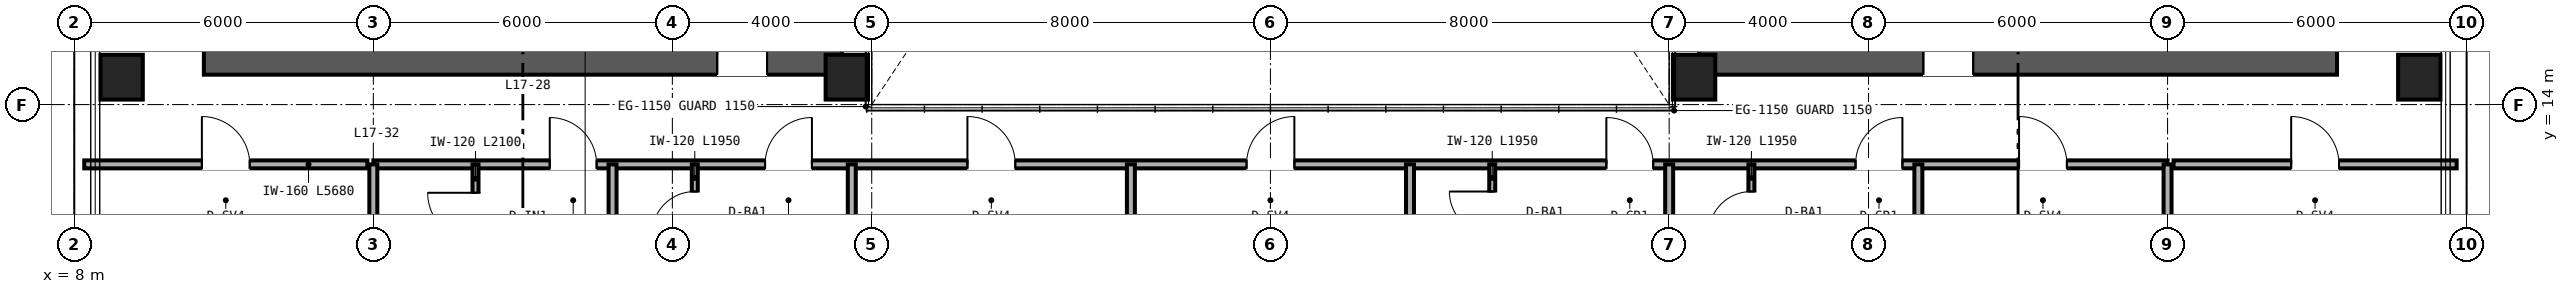
"""IFC4 building model, lengths in metres.
Left out: names, types, materials, properties, quantities, classifications, styles, units other than length and angle.
Written with IfcOpenShell. Run it as: python <this file> out.ifc"""

import sys

from ifc_helpers import new_model, si_unit, direction, frame, frame_2d, origin, origin_2d, place, context, subcontext, project, spatial, rectangle, hollow_rectangle, extrude, source, transform, mapped, element, fill, save


model = new_model("IFC4")
c1 = context("Model", 3, precision=1e-05, world=origin(), true_north=direction((0.0, 1.0)))
c2 = subcontext(c1, "Body", "Model", "MODEL_VIEW")
j1 = project(units=[si_unit("LENGTHUNIT", "METRE"), si_unit("PLANEANGLEUNIT", "RADIAN")], contexts=[c1])
p1 = place(None, origin())
s1 = spatial("IfcSite", under=j1, at=p1, CompositionType="ELEMENT")
p2 = place(p1, origin())
s2 = spatial("IfcBuilding", under=s1, at=p2, CompositionType="ELEMENT")
p3 = place(p2, frame((0.0, 0.0, 70.8)))
s3 = spatial("IfcBuildingStorey", under=s2, at=p3, CompositionType="ELEMENT", Elevation=70.8)
p4 = place(p3, frame((10.6, 15.0, 0.0), z_axis=(0.0, 0.0, 1.0), x_axis=(1.0, 0.0, 0.0)))
e1 = element("IfcWall", 1, at=p4, inside=s3, PredefinedType="SHEAR", context=c2, shape_type="SweptSolid", body=[
    extrude(rectangle(XDim=12.8, YDim=0.8, at=frame_2d((6.4, 0.0))), origin(), (0.0, 0.0, 1.0), 3.35),
])
p5 = place(p4, frame((10.3, 0.0, 0.0)))
e2 = element("IfcOpeningElement", 2, at=p5, cuts=e1, PredefinedType="OPENING", context=c2, shape_type="SweptSolid", body=[
    extrude(rectangle(XDim=1.0, YDim=2.15, at=frame_2d((0.5, 1.075))), frame((0.0, 0.41, 0.0), z_axis=(0.0, -1.0, 0.0), x_axis=(1.0, 0.0, 0.0)), (0.0, 0.0, 1.0), 0.82),
])
p6 = place(p3, frame((40.6, 15.0, 0.0), z_axis=(0.0, 0.0, 1.0), x_axis=(1.0, 0.0, 0.0)))
e3 = element("IfcWall", 3, at=p6, inside=s3, PredefinedType="SHEAR", context=c2, shape_type="SweptSolid", body=[
    extrude(rectangle(XDim=12.8, YDim=0.8, at=frame_2d((6.4, 0.0))), origin(), (0.0, 0.0, 1.0), 3.35),
])
p7 = place(p6, frame((4.5, 0.0, 0.0)))
e4 = element("IfcOpeningElement", 4, at=p7, cuts=e3, PredefinedType="OPENING", context=c2, shape_type="SweptSolid", body=[
    extrude(rectangle(XDim=1.0, YDim=2.15, at=frame_2d((0.5, 1.075))), frame((0.0, 0.41, 0.0), z_axis=(0.0, -1.0, 0.0), x_axis=(1.0, 0.0, 0.0)), (0.0, 0.0, 1.0), 0.82),
])
m1 = source(origin(), c2, "Body", "SweptSolid", [
    extrude(hollow_rectangle(XDim=0.85, YDim=0.9, WallThickness=0.04, at=origin_2d()), origin(), (0.0, 0.0, 1.0), 3.35),
])
for number, where, z_axis, x_axis in (
    (5, (8.95, 14.55, 0.0), (0.0, 0.0, 1.0), (1.0, 0.0, 0.0)),
    (6, (23.5, 14.55, 0.0), (0.0, 0.0, 1.0), (1.0, 0.0, 0.0)),
    (7, (40.5, 14.55, 0.0), (0.0, 0.0, 1.0), (1.0, 0.0, 0.0)),
    (8, (55.05, 14.55, 0.0), (0.0, 0.0, 1.0), (1.0, 0.0, 0.0)),
):
    element("IfcColumn", number, at=place(p3, frame(where, z_axis=z_axis, x_axis=x_axis)), inside=s3, PredefinedType="COLUMN", context=c2, shape_type="MappedRepresentation", body=[
        mapped(m1, transform((0.0, 0.0, 0.0), scale=1.0)),
    ])
p8 = place(p3, frame((8.2, 12.8, 0.0), z_axis=(0.0, 0.0, 1.0), x_axis=(1.0, 0.0, 0.0)))
e9 = element("IfcWall", 9, at=p8, inside=s3, PredefinedType="PARTITIONING", context=c2, shape_type="SweptSolid", body=[
    extrude(rectangle(XDim=5.68, YDim=0.16, at=frame_2d((2.84, 0.0))), origin(), (0.0, 0.0, 1.0), 3.35),
])
p9 = place(p8, frame((2.36, 0.0, 0.0)))
e10 = element("IfcOpeningElement", 10, at=p9, cuts=e9, PredefinedType="OPENING", context=c2, shape_type="SweptSolid", body=[
    extrude(rectangle(XDim=0.96, YDim=2.15, at=frame_2d((0.48, 1.075))), frame((0.0, 0.09, 0.0), z_axis=(0.0, -1.0, 0.0), x_axis=(1.0, 0.0, 0.0)), (0.0, 0.0, 1.0), 0.18),
])
p10 = place(p3, frame((50.12, 12.8, 0.0), z_axis=(0.0, 0.0, 1.0), x_axis=(1.0, 0.0, 0.0)))
e11 = element("IfcWall", 11, at=p10, inside=s3, PredefinedType="PARTITIONING", context=c2, shape_type="SweptSolid", body=[
    extrude(rectangle(XDim=5.68, YDim=0.16, at=frame_2d((2.84, 0.0))), origin(), (0.0, 0.0, 1.0), 3.35),
])
p11 = place(p10, frame((2.36, 0.0, 0.0)))
e12 = element("IfcOpeningElement", 12, at=p11, cuts=e11, PredefinedType="OPENING", context=c2, shape_type="SweptSolid", body=[
    extrude(rectangle(XDim=0.96, YDim=2.15, at=frame_2d((0.48, 1.075))), frame((0.0, 0.09, 0.0), z_axis=(0.0, -1.0, 0.0), x_axis=(1.0, 0.0, 0.0)), (0.0, 0.0, 1.0), 0.18),
])
p12 = place(p3, frame((14.0, 12.8, 0.0), z_axis=(0.0, 0.0, 1.0), x_axis=(1.0, 0.0, 0.0)))
e13 = element("IfcWall", 13, at=p12, inside=s3, PredefinedType="PARTITIONING", context=c2, shape_type="SweptSolid", body=[
    extrude(rectangle(XDim=36.0, YDim=0.16, at=frame_2d((18.0, 0.0))), origin(), (0.0, 0.0, 1.0), 2.571),
])
p13 = place(p12, frame((3.54, 0.0, 0.0)))
e14 = element("IfcOpeningElement", 14, at=p13, cuts=e13, PredefinedType="OPENING", context=c2, shape_type="SweptSolid", body=[
    extrude(rectangle(XDim=0.94, YDim=2.15, at=frame_2d((0.47, 1.075))), frame((0.0, 0.09, 0.0), z_axis=(0.0, -1.0, 0.0), x_axis=(1.0, 0.0, 0.0)), (0.0, 0.0, 1.0), 0.18),
])
p14 = place(p12, frame((7.86, 0.0, 0.0)))
e15 = element("IfcOpeningElement", 15, at=p14, cuts=e13, PredefinedType="OPENING", context=c2, shape_type="SweptSolid", body=[
    extrude(rectangle(XDim=0.94, YDim=2.15, at=frame_2d((0.47, 1.075))), frame((0.0, 0.09, 0.0), z_axis=(0.0, -1.0, 0.0), x_axis=(1.0, 0.0, 0.0)), (0.0, 0.0, 1.0), 0.18),
])
p15 = place(p12, frame((11.92, 0.0, 0.0)))
e16 = element("IfcOpeningElement", 16, at=p15, cuts=e13, PredefinedType="OPENING", context=c2, shape_type="SweptSolid", body=[
    extrude(rectangle(XDim=0.96, YDim=2.15, at=frame_2d((0.48, 1.075))), frame((0.0, 0.09, 0.0), z_axis=(0.0, -1.0, 0.0), x_axis=(1.0, 0.0, 0.0)), (0.0, 0.0, 1.0), 0.18),
])
p16 = place(p12, frame((17.52, 0.0, 0.0)))
e17 = element("IfcOpeningElement", 17, at=p16, cuts=e13, PredefinedType="OPENING", context=c2, shape_type="SweptSolid", body=[
    extrude(rectangle(XDim=0.96, YDim=2.15, at=frame_2d((0.48, 1.075))), frame((0.0, 0.09, 0.0), z_axis=(0.0, -1.0, 0.0), x_axis=(1.0, 0.0, 0.0)), (0.0, 0.0, 1.0), 0.18),
])
p17 = place(p12, frame((24.74, 0.0, 0.0)))
e18 = element("IfcOpeningElement", 18, at=p17, cuts=e13, PredefinedType="OPENING", context=c2, shape_type="SweptSolid", body=[
    extrude(rectangle(XDim=0.94, YDim=2.15, at=frame_2d((0.47, 1.075))), frame((0.0, 0.09, 0.0), z_axis=(0.0, -1.0, 0.0), x_axis=(1.0, 0.0, 0.0)), (0.0, 0.0, 1.0), 0.18),
])
p18 = place(p12, frame((29.74, 0.0, 0.0)))
e19 = element("IfcOpeningElement", 19, at=p18, cuts=e13, PredefinedType="OPENING", context=c2, shape_type="SweptSolid", body=[
    extrude(rectangle(XDim=0.94, YDim=2.15, at=frame_2d((0.47, 1.075))), frame((0.0, 0.09, 0.0), z_axis=(0.0, -1.0, 0.0), x_axis=(1.0, 0.0, 0.0)), (0.0, 0.0, 1.0), 0.18),
])
p19 = place(p12, frame((33.02, 0.0, 0.0)))
e20 = element("IfcOpeningElement", 20, at=p19, cuts=e13, PredefinedType="OPENING", context=c2, shape_type="SweptSolid", body=[
    extrude(rectangle(XDim=0.96, YDim=2.15, at=frame_2d((0.48, 1.075))), frame((0.0, 0.09, 0.0), z_axis=(0.0, -1.0, 0.0), x_axis=(1.0, 0.0, 0.0)), (0.0, 0.0, 1.0), 0.18),
])
for number, where, z_axis, x_axis in (
    (21, (14.0, 2.36, 0.0), (0.0, 0.0, 1.0), (0.0, 1.0, 0.0)),
    (22, (50.0, 2.36, 0.0), (0.0, 0.0, 1.0), (0.0, 1.0, 0.0)),
    (23, (18.8, 2.36, 0.0), (0.0, 0.0, 1.0), (0.0, 1.0, 0.0)),
):
    element("IfcWall", number, at=place(p3, frame(where, z_axis=z_axis, x_axis=x_axis)), inside=s3, PredefinedType="PARTITIONING", context=c2, shape_type="SweptSolid", body=[
        extrude(rectangle(XDim=10.44, YDim=0.16, at=frame_2d((5.22, 0.0))), origin(), (0.0, 0.0, 1.0), 2.657),
    ])
p20 = place(p3, frame((16.05, 10.7, 0.0), z_axis=(0.0, 0.0, 1.0), x_axis=(0.0, 1.0, 0.0)))
e24 = element("IfcWall", 24, at=p20, inside=s3, PredefinedType="PARTITIONING", context=c2, shape_type="SweptSolid", body=[
    extrude(rectangle(XDim=2.1, YDim=0.12, at=frame_2d((1.05, 0.0))), origin(), (0.0, 0.0, 1.0), 3.35),
])
p21 = place(p20, frame((0.57, 0.0, 0.0)))
e25 = element("IfcOpeningElement", 25, at=p21, cuts=e24, PredefinedType="OPENING", context=c2, shape_type="SweptSolid", body=[
    extrude(rectangle(XDim=0.96, YDim=2.15, at=frame_2d((0.48, 1.075))), frame((0.0, 0.07, 0.0), z_axis=(0.0, -1.0, 0.0), x_axis=(1.0, 0.0, 0.0)), (0.0, 0.0, 1.0), 0.14),
])
p22 = place(p3, frame((23.6, 2.36, 0.0), z_axis=(0.0, 0.0, 1.0), x_axis=(0.0, 1.0, 0.0)))
e26 = element("IfcWall", 26, at=p22, inside=s3, PredefinedType="PARTITIONING", context=c2, shape_type="SweptSolid", body=[
    extrude(rectangle(XDim=10.44, YDim=0.16, at=frame_2d((5.22, 0.0))), origin(), (0.0, 0.0, 1.0), 2.423),
])
p23 = place(p3, frame((20.45, 10.85, 0.0), z_axis=(0.0, 0.0, 1.0), x_axis=(0.0, 1.0, 0.0)))
e27 = element("IfcWall", 27, at=p23, inside=s3, PredefinedType="PARTITIONING", context=c2, shape_type="SweptSolid", body=[
    extrude(rectangle(XDim=1.95, YDim=0.12, at=frame_2d((0.975, 0.0))), origin(), (0.0, 0.0, 1.0), 3.35),
])
p24 = place(p23, frame((0.545, 0.0, 0.0)))
e28 = element("IfcOpeningElement", 28, at=p24, cuts=e27, PredefinedType="OPENING", context=c2, shape_type="SweptSolid", body=[
    extrude(rectangle(XDim=0.86, YDim=2.1, at=frame_2d((0.43, 1.05))), frame((0.0, 0.07, 0.0), z_axis=(0.0, -1.0, 0.0), x_axis=(1.0, 0.0, 0.0)), (0.0, 0.0, 1.0), 0.14),
])
for number, where, z_axis, x_axis in (
    (29, (29.2, 2.36, 0.0), (0.0, 0.0, 1.0), (0.0, 1.0, 0.0)),
    (30, (34.8, 2.36, 0.0), (0.0, 0.0, 1.0), (0.0, 1.0, 0.0)),
    (31, (40.0, 2.36, 0.0), (0.0, 0.0, 1.0), (0.0, 1.0, 0.0)),
):
    element("IfcWall", number, at=place(p3, frame(where, z_axis=z_axis, x_axis=x_axis)), inside=s3, PredefinedType="PARTITIONING", context=c2, shape_type="SweptSolid", body=[
        extrude(rectangle(XDim=10.44, YDim=0.16, at=frame_2d((5.22, 0.0))), origin(), (0.0, 0.0, 1.0), 2.423),
    ])
p25 = place(p3, frame((36.45, 10.85, 0.0), z_axis=(0.0, 0.0, 1.0), x_axis=(0.0, 1.0, 0.0)))
e32 = element("IfcWall", 32, at=p25, inside=s3, PredefinedType="PARTITIONING", context=c2, shape_type="SweptSolid", body=[
    extrude(rectangle(XDim=1.95, YDim=0.12, at=frame_2d((0.975, 0.0))), origin(), (0.0, 0.0, 1.0), 3.35),
])
p26 = place(p25, frame((0.545, 0.0, 0.0)))
e33 = element("IfcOpeningElement", 33, at=p26, cuts=e32, PredefinedType="OPENING", context=c2, shape_type="SweptSolid", body=[
    extrude(rectangle(XDim=0.86, YDim=2.1, at=frame_2d((0.43, 1.05))), frame((0.0, 0.07, 0.0), z_axis=(0.0, -1.0, 0.0), x_axis=(1.0, 0.0, 0.0)), (0.0, 0.0, 1.0), 0.14),
])
p27 = place(p3, frame((45.0, 2.36, 0.0), z_axis=(0.0, 0.0, 1.0), x_axis=(0.0, 1.0, 0.0)))
e34 = element("IfcWall", 34, at=p27, inside=s3, PredefinedType="PARTITIONING", context=c2, shape_type="SweptSolid", body=[
    extrude(rectangle(XDim=10.44, YDim=0.16, at=frame_2d((5.22, 0.0))), origin(), (0.0, 0.0, 1.0), 2.657),
])
p28 = place(p3, frame((41.65, 10.85, 0.0), z_axis=(0.0, 0.0, 1.0), x_axis=(0.0, 1.0, 0.0)))
e35 = element("IfcWall", 35, at=p28, inside=s3, PredefinedType="PARTITIONING", context=c2, shape_type="SweptSolid", body=[
    extrude(rectangle(XDim=1.95, YDim=0.12, at=frame_2d((0.975, 0.0))), origin(), (0.0, 0.0, 1.0), 3.35),
])
p29 = place(p28, frame((0.545, 0.0, 0.0)))
e36 = element("IfcOpeningElement", 36, at=p29, cuts=e35, PredefinedType="OPENING", context=c2, shape_type="SweptSolid", body=[
    extrude(rectangle(XDim=0.86, YDim=2.1, at=frame_2d((0.43, 1.05))), frame((0.0, 0.07, 0.0), z_axis=(0.0, -1.0, 0.0), x_axis=(1.0, 0.0, 0.0)), (0.0, 0.0, 1.0), 0.14),
])
m2 = source(origin(), c2, "Body", "SweptSolid", [
    extrude(rectangle(XDim=1.0, YDim=2.15, at=frame_2d((0.5, 1.075))), frame((0.0, 0.025, 0.0), z_axis=(0.0, -1.0, 0.0), x_axis=(1.0, 0.0, 0.0)), (0.0, 0.0, 1.0), 0.05),
])
p30 = place(p5, origin())
e37 = element("IfcDoor", 37, at=p30, inside=s3, OperationType="SINGLE_SWING_LEFT", PredefinedType="DOOR", context=c2, shape_type="MappedRepresentation", body=[
    mapped(m2, transform((0.0, 0.0, 0.0), scale=1.0)),
])
fill(e2, e37)
p31 = place(p7, origin())
e38 = element("IfcDoor", 38, at=p31, inside=s3, OperationType="SINGLE_SWING_RIGHT", PredefinedType="DOOR", context=c2, shape_type="MappedRepresentation", body=[
    mapped(m2, transform((0.0, 0.0, 0.0), scale=1.0)),
])
fill(e4, e38)
m3 = source(origin(), c2, "Body", "SweptSolid", [
    extrude(rectangle(XDim=0.96, YDim=2.15, at=frame_2d((0.48, 1.075))), frame((0.0, 0.025, 0.0), z_axis=(0.0, -1.0, 0.0), x_axis=(1.0, 0.0, 0.0)), (0.0, 0.0, 1.0), 0.05),
])
p32 = place(p9, origin())
e39 = element("IfcDoor", 39, at=p32, inside=s3, OperationType="SINGLE_SWING_LEFT", PredefinedType="DOOR", context=c2, shape_type="MappedRepresentation", body=[
    mapped(m3, transform((0.0, 0.0, 0.0), scale=1.0)),
])
fill(e10, e39)
p33 = place(p11, origin())
e40 = element("IfcDoor", 40, at=p33, inside=s3, OperationType="SINGLE_SWING_LEFT", PredefinedType="DOOR", context=c2, shape_type="MappedRepresentation", body=[
    mapped(m3, transform((0.0, 0.0, 0.0), scale=1.0)),
])
fill(e12, e40)
p34 = place(p21, origin())
e41 = element("IfcDoor", 41, at=p34, inside=s3, OperationType="SINGLE_SWING_RIGHT", PredefinedType="DOOR", context=c2, shape_type="MappedRepresentation", body=[
    mapped(m3, transform((0.0, 0.0, 0.0), scale=1.0)),
])
fill(e25, e41)
m4 = source(origin(), c2, "Body", "SweptSolid", [
    extrude(rectangle(XDim=0.86, YDim=2.1, at=frame_2d((0.43, 1.05))), frame((0.0, 0.025, 0.0), z_axis=(0.0, -1.0, 0.0), x_axis=(1.0, 0.0, 0.0)), (0.0, 0.0, 1.0), 0.05),
])
p35 = place(p24, origin())
e42 = element("IfcDoor", 42, at=p35, inside=s3, OperationType="SINGLE_SWING_LEFT", PredefinedType="DOOR", context=c2, shape_type="MappedRepresentation", body=[
    mapped(m4, transform((0.0, 0.0, 0.0), scale=1.0)),
])
fill(e28, e42)
p36 = place(p26, origin())
e43 = element("IfcDoor", 43, at=p36, inside=s3, OperationType="SINGLE_SWING_RIGHT", PredefinedType="DOOR", context=c2, shape_type="MappedRepresentation", body=[
    mapped(m4, transform((0.0, 0.0, 0.0), scale=1.0)),
])
fill(e33, e43)
p37 = place(p29, origin())
e44 = element("IfcDoor", 44, at=p37, inside=s3, OperationType="SINGLE_SWING_LEFT", PredefinedType="DOOR", context=c2, shape_type="MappedRepresentation", body=[
    mapped(m4, transform((0.0, 0.0, 0.0), scale=1.0)),
])
fill(e36, e44)
m5 = source(origin(), c2, "Body", "SweptSolid", [
    extrude(rectangle(XDim=0.94, YDim=2.15, at=frame_2d((0.47, 1.075))), frame((0.0, 0.025, 0.0), z_axis=(0.0, -1.0, 0.0), x_axis=(1.0, 0.0, 0.0)), (0.0, 0.0, 1.0), 0.05),
])
p38 = place(p13, origin())
e45 = element("IfcDoor", 45, at=p38, inside=s3, OperationType="SINGLE_SWING_LEFT", PredefinedType="DOOR", context=c2, shape_type="MappedRepresentation", body=[
    mapped(m5, transform((0.0, 0.0, 0.0), scale=1.0)),
])
fill(e14, e45)
p39 = place(p14, origin())
e46 = element("IfcDoor", 46, at=p39, inside=s3, OperationType="SINGLE_SWING_RIGHT", PredefinedType="DOOR", context=c2, shape_type="MappedRepresentation", body=[
    mapped(m5, transform((0.0, 0.0, 0.0), scale=1.0)),
])
fill(e15, e46)
p40 = place(p15, origin())
e47 = element("IfcDoor", 47, at=p40, inside=s3, OperationType="SINGLE_SWING_LEFT", PredefinedType="DOOR", context=c2, shape_type="MappedRepresentation", body=[
    mapped(m3, transform((0.0, 0.0, 0.0), scale=1.0)),
])
fill(e16, e47)
p41 = place(p16, origin())
e48 = element("IfcDoor", 48, at=p41, inside=s3, OperationType="SINGLE_SWING_RIGHT", PredefinedType="DOOR", context=c2, shape_type="MappedRepresentation", body=[
    mapped(m3, transform((0.0, 0.0, 0.0), scale=1.0)),
])
fill(e17, e48)
p42 = place(p17, origin())
e49 = element("IfcDoor", 49, at=p42, inside=s3, OperationType="SINGLE_SWING_LEFT", PredefinedType="DOOR", context=c2, shape_type="MappedRepresentation", body=[
    mapped(m5, transform((0.0, 0.0, 0.0), scale=1.0)),
])
fill(e18, e49)
p43 = place(p18, origin())
e50 = element("IfcDoor", 50, at=p43, inside=s3, OperationType="SINGLE_SWING_RIGHT", PredefinedType="DOOR", context=c2, shape_type="MappedRepresentation", body=[
    mapped(m5, transform((0.0, 0.0, 0.0), scale=1.0)),
])
fill(e19, e50)
p44 = place(p19, origin())
e51 = element("IfcDoor", 51, at=p44, inside=s3, OperationType="SINGLE_SWING_LEFT", PredefinedType="DOOR", context=c2, shape_type="MappedRepresentation", body=[
    mapped(m3, transform((0.0, 0.0, 0.0), scale=1.0)),
])
fill(e20, e51)
save(model, sys.argv[1])
